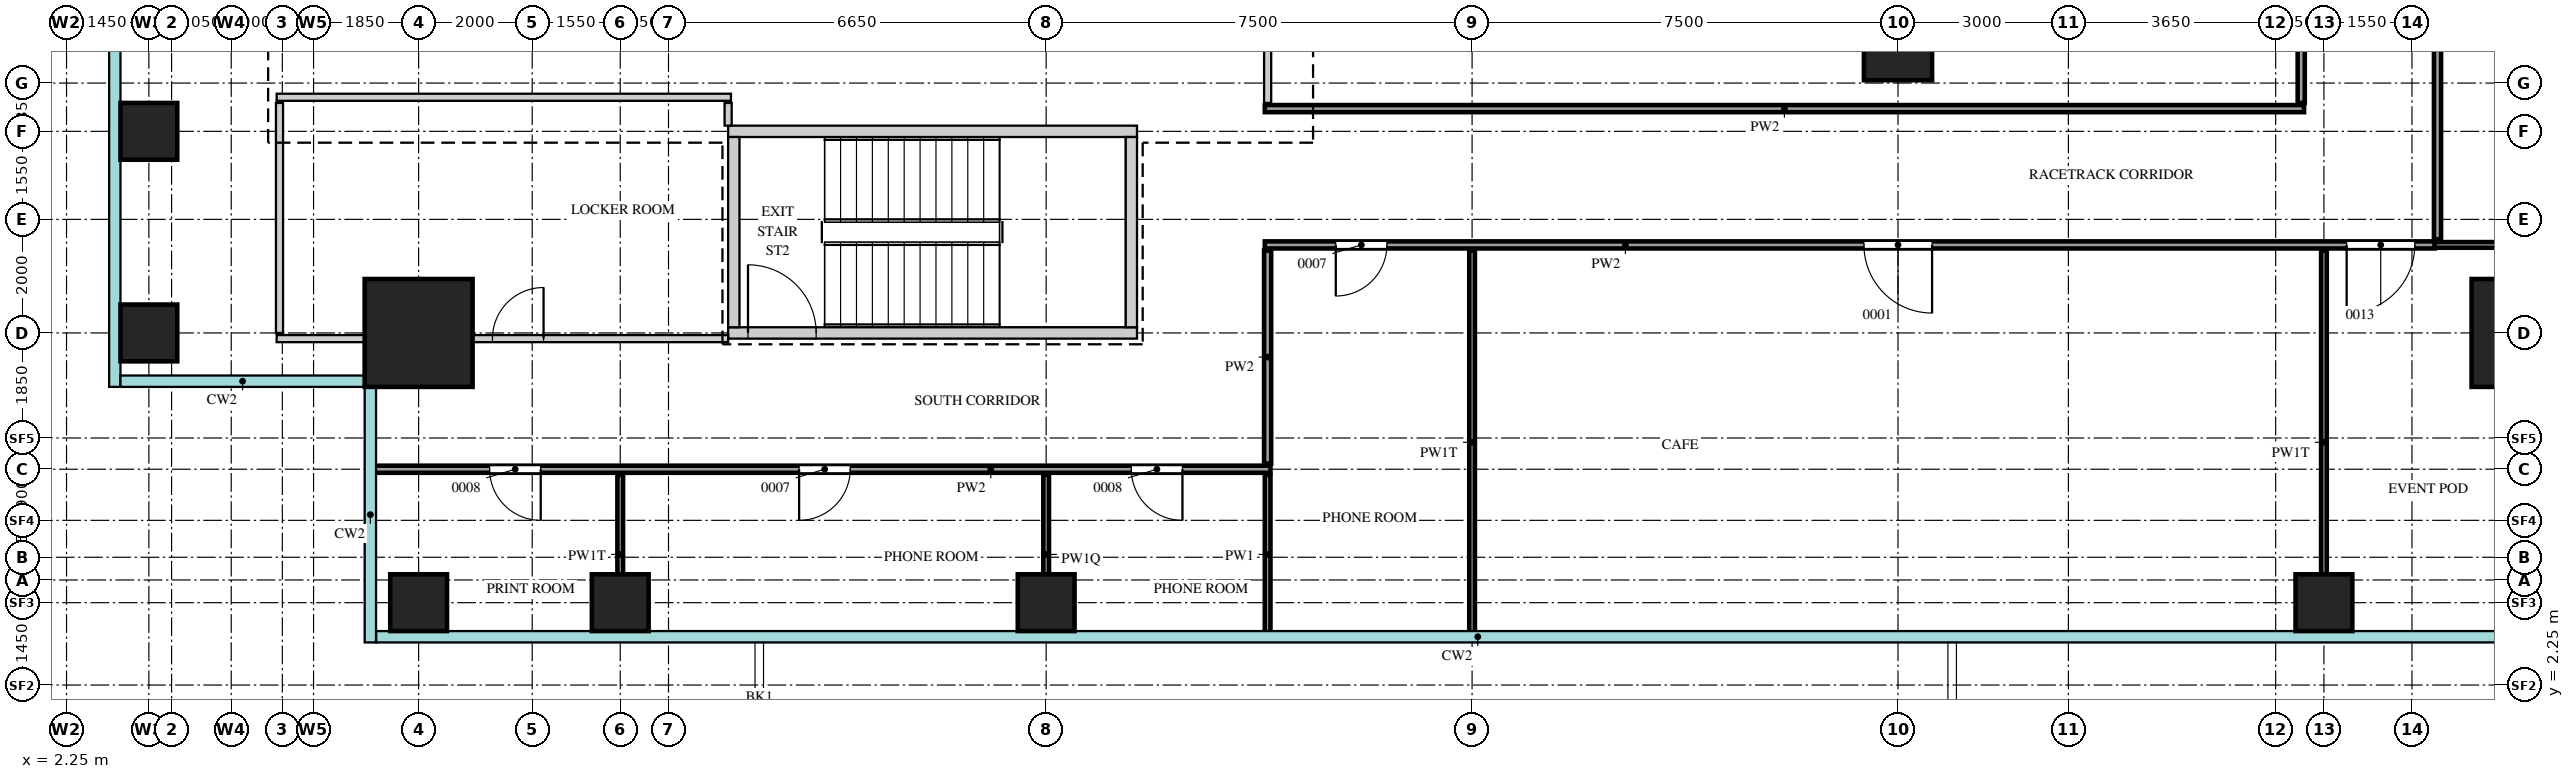
"""IFC4 building model, lengths in metres.
Left out: names, types, materials, properties, quantities, classifications, styles, units other than length and angle.
Written with IfcOpenShell. Run it as: python <this file> out.ifc"""

import sys

from ifc_helpers import new_model, si_unit, direction, frame, frame_2d, origin, origin_2d, place, context, subcontext, project, spatial, rectangle, extrude, source, transform, mapped, element, fill, save


model = new_model("IFC4")
c1 = context("Model", 3, precision=1e-05, world=origin(), true_north=direction((0.0, 1.0)))
c2 = subcontext(c1, "Body", "Model", "MODEL_VIEW")
j1 = project(units=[si_unit("LENGTHUNIT", "METRE"), si_unit("PLANEANGLEUNIT", "RADIAN")], contexts=[c1])
p1 = place(None, origin())
s1 = spatial("IfcSite", under=j1, at=p1, CompositionType="ELEMENT")
p2 = place(p1, origin())
s2 = spatial("IfcBuilding", under=s1, at=p2, CompositionType="ELEMENT")
p3 = place(p2, frame((0.0, 0.0, 196.7)))
s3 = spatial("IfcBuildingStorey", under=s2, at=p3, CompositionType="ELEMENT", Elevation=196.7)
m1 = source(origin(), c2, "Body", "SweptSolid", [
    extrude(rectangle(XDim=7.2, YDim=0.2, at=frame_2d((3.6, 0.0))), origin(), (0.0, 0.0, 1.0), 3.75),
])
p4 = place(p3, frame((13.9, 12.0, 0.0), z_axis=(0.0, 0.0, 1.0), x_axis=(1.0, 0.0, 0.0)))
e1 = element("IfcWall", 1, at=p4, inside=s3, PredefinedType="SHEAR", context=c2, shape_type="MappedRepresentation", body=[
    mapped(m1, transform((0.0, 0.0, 0.0))),
])
p5 = place(p3, frame((13.9, 8.45, 0.0), z_axis=(0.0, 0.0, 1.0), x_axis=(1.0, 0.0, 0.0)))
e2 = element("IfcWall", 2, at=p5, inside=s3, PredefinedType="SHEAR", context=c2, shape_type="MappedRepresentation", body=[
    mapped(m1, transform((0.0, 0.0, 0.0))),
])
m2 = source(origin(), c2, "Body", "SweptSolid", [
    extrude(rectangle(XDim=1.2, YDim=2.1, at=frame_2d((0.6, 1.05))), frame((0.0, 0.11, 0.0), z_axis=(0.0, -1.0, 0.0), x_axis=(1.0, 0.0, 0.0)), (0.0, 0.0, 1.0), 0.22),
])
p6 = place(p5, frame((0.35, 0.0, 0.0)))
e3 = element("IfcOpeningElement", 3, at=p6, cuts=e2, PredefinedType="OPENING", context=c2, shape_type="MappedRepresentation", body=[
    mapped(m2, transform((0.0, 0.0, 0.0))),
])
m3 = source(origin(), c2, "Body", "SweptSolid", [
    extrude(rectangle(XDim=3.35, YDim=0.2, at=frame_2d((1.675, 0.0))), origin(), (0.0, 0.0, 1.0), 3.75),
])
for number, where, z_axis, x_axis in (
    (4, (21.0, 8.55, 0.0), (0.0, 0.0, 1.0), (0.0, 1.0, 0.0)),
    (5, (14.0, 8.55, 0.0), (0.0, 0.0, 1.0), (0.0, 1.0, 0.0)),
):
    element("IfcWall", number, at=place(p3, frame(where, z_axis=z_axis, x_axis=x_axis)), inside=s3, PredefinedType="SHEAR", context=c2, shape_type="MappedRepresentation", body=[
        mapped(m3, transform((0.0, 0.0, 0.0))),
    ])
m4 = source(origin(), c2, "Body", "SweptSolid", [
    extrude(rectangle(XDim=1.9, YDim=1.9, at=origin_2d()), origin(), (0.0, 0.0, 1.0), 4.0),
])
for number, where, z_axis, x_axis in (
    (6, (45.55, 8.45, 0.0), (0.0, 0.0, 1.0), (1.0, 0.0, 0.0)),
    (7, (8.45, 8.45, 0.0), (0.0, 0.0, 1.0), (1.0, 0.0, 0.0)),
):
    element("IfcColumn", number, at=place(p3, frame(where, z_axis=z_axis, x_axis=x_axis)), inside=s3, PredefinedType="COLUMN", context=c2, shape_type="MappedRepresentation", body=[
        mapped(m4, transform((0.0, 0.0, 0.0))),
    ])
m5 = source(origin(), c2, "Body", "SweptSolid", [
    extrude(rectangle(XDim=1.0, YDim=1.0, at=origin_2d()), origin(), (0.0, 0.0, 1.0), 3.75),
])
for number, where, z_axis, x_axis in (
    (8, (8.45, 3.7, 0.0), (0.0, 0.0, 1.0), (1.0, 0.0, 0.0)),
    (9, (12.0, 3.7, 0.0), (0.0, 0.0, 1.0), (1.0, 0.0, 0.0)),
    (10, (19.5, 3.7, 0.0), (0.0, 0.0, 1.0), (1.0, 0.0, 0.0)),
    (11, (42.0, 3.7, 0.0), (0.0, 0.0, 1.0), (1.0, 0.0, 0.0)),
    (12, (3.7, 8.45, 0.0), (0.0, 0.0, 1.0), (1.0, 0.0, 0.0)),
    (13, (3.7, 12.0, 0.0), (0.0, 0.0, 1.0), (1.0, 0.0, 0.0)),
):
    element("IfcColumn", number, at=place(p3, frame(where, z_axis=z_axis, x_axis=x_axis)), inside=s3, PredefinedType="COLUMN", context=c2, shape_type="MappedRepresentation", body=[
        mapped(m5, transform((0.0, 0.0, 0.0))),
    ])
m6 = source(origin(), c2, "Body", "SweptSolid", [
    extrude(rectangle(XDim=1.2, YDim=1.2, at=origin_2d()), origin(), (0.0, 0.0, 1.0), 3.75),
])
p7 = place(p3, frame((34.5, 13.5, 0.0), z_axis=(0.0, 0.0, 1.0), x_axis=(1.0, 0.0, 0.0)))
e14 = element("IfcColumn", 14, at=p7, inside=s3, PredefinedType="COLUMN", context=c2, shape_type="MappedRepresentation", body=[
    mapped(m6, transform((0.0, 0.0, 0.0))),
])
m7 = source(origin(), c2, "Body", "SweptSolid", [
    extrude(rectangle(XDim=2.8, YDim=0.1, at=frame_2d((1.4, 0.0))), origin(), (0.0, 0.0, 1.0), 3.3),
])
p8 = place(p3, frame((12.0, 3.15, 0.0), z_axis=(0.0, 0.0, 1.0), x_axis=(0.0, 1.0, 0.0)))
e15 = element("IfcWall", 15, at=p8, inside=s3, PredefinedType="PARTITIONING", context=c2, shape_type="MappedRepresentation", body=[
    mapped(m7, transform((0.0, 0.0, 0.0))),
])
m8 = source(origin(), c2, "Body", "SweptSolid", [
    extrude(rectangle(XDim=2.8, YDim=0.1, at=frame_2d((1.4, 0.0))), origin(), (0.0, 0.0, 1.0), 3.42),
])
p9 = place(p3, frame((19.5, 3.15, 0.0), z_axis=(0.0, 0.0, 1.0), x_axis=(0.0, 1.0, 0.0)))
e16 = element("IfcWall", 16, at=p9, inside=s3, PredefinedType="PARTITIONING", context=c2, shape_type="MappedRepresentation", body=[
    mapped(m8, transform((0.0, 0.0, 0.0))),
])
m9 = source(origin(), c2, "Body", "SweptSolid", [
    extrude(rectangle(XDim=2.8, YDim=0.1, at=frame_2d((1.4, 0.0))), origin(), (0.0, 0.0, 1.0), 3.8),
])
p10 = place(p3, frame((23.4, 3.15, 0.0), z_axis=(0.0, 0.0, 1.0), x_axis=(0.0, 1.0, 0.0)))
e17 = element("IfcWall", 17, at=p10, inside=s3, PredefinedType="PARTITIONING", context=c2, shape_type="MappedRepresentation", body=[
    mapped(m9, transform((0.0, 0.0, 0.0))),
])
m10 = source(origin(), c2, "Body", "SweptSolid", [
    extrude(rectangle(XDim=6.75, YDim=0.1, at=frame_2d((3.375, 0.0))), origin(), (0.0, 0.0, 1.0), 3.3),
])
for number, where, z_axis, x_axis in (
    (18, (27.0, 3.15, 0.0), (0.0, 0.0, 1.0), (0.0, 1.0, 0.0)),
    (19, (42.0, 3.15, 0.0), (0.0, 0.0, 1.0), (0.0, 1.0, 0.0)),
):
    element("IfcWall", number, at=place(p3, frame(where, z_axis=z_axis, x_axis=x_axis)), inside=s3, PredefinedType="PARTITIONING", context=c2, shape_type="MappedRepresentation", body=[
        mapped(m10, transform((0.0, 0.0, 0.0))),
    ])
m11 = source(origin(), c2, "Body", "SweptSolid", [
    extrude(rectangle(XDim=15.8, YDim=0.125, at=frame_2d((7.9, 0.0))), origin(), (0.0, 0.0, 1.0), 3.8),
])
p11 = place(p3, frame((7.65, 6.05, 0.0), z_axis=(0.0, 0.0, 1.0), x_axis=(1.0, 0.0, 0.0)))
e20 = element("IfcWall", 20, at=p11, inside=s3, PredefinedType="PARTITIONING", context=c2, shape_type="MappedRepresentation", body=[
    mapped(m11, transform((0.0, 0.0, 0.0))),
])
m12 = source(origin(), c2, "Body", "SweptSolid", [
    extrude(rectangle(XDim=0.9, YDim=2.1, at=frame_2d((0.45, 1.05))), frame((0.0, 0.073, 0.0), z_axis=(0.0, -1.0, 0.0), x_axis=(1.0, 0.0, 0.0)), (0.0, 0.0, 1.0), 0.145),
])
p12 = place(p11, frame((2.05, 0.0, 0.0)))
e21 = element("IfcOpeningElement", 21, at=p12, cuts=e20, PredefinedType="OPENING", context=c2, shape_type="MappedRepresentation", body=[
    mapped(m12, transform((0.0, 0.0, 0.0))),
])
p13 = place(p11, frame((7.5, 0.0, 0.0)))
e22 = element("IfcOpeningElement", 22, at=p13, cuts=e20, PredefinedType="OPENING", context=c2, shape_type="MappedRepresentation", body=[
    mapped(m12, transform((0.0, 0.0, 0.0))),
])
p14 = place(p11, frame((13.35, 0.0, 0.0)))
e23 = element("IfcOpeningElement", 23, at=p14, cuts=e20, PredefinedType="OPENING", context=c2, shape_type="MappedRepresentation", body=[
    mapped(m12, transform((0.0, 0.0, 0.0))),
])
m13 = source(origin(), c2, "Body", "SweptSolid", [
    extrude(rectangle(XDim=3.75, YDim=0.125, at=frame_2d((1.875, 0.0))), origin(), (0.0, 0.0, 1.0), 3.8),
])
p15 = place(p3, frame((23.4, 6.15, 0.0), z_axis=(0.0, 0.0, 1.0), x_axis=(0.0, 1.0, 0.0)))
e24 = element("IfcWall", 24, at=p15, inside=s3, PredefinedType="PARTITIONING", context=c2, shape_type="MappedRepresentation", body=[
    mapped(m13, transform((0.0, 0.0, 0.0))),
])
m14 = source(origin(), c2, "Body", "SweptSolid", [
    extrude(rectangle(XDim=7.95, YDim=0.125, at=frame_2d((3.975, 0.0))), origin(), (0.0, 0.0, 1.0), 3.25),
])
p16 = place(p3, frame((5.95, 8.35, 0.0), z_axis=(0.0, 0.0, 1.0), x_axis=(1.0, 0.0, 0.0)))
e25 = element("IfcWall", 25, at=p16, inside=s3, PredefinedType="PARTITIONING", context=c2, shape_type="MappedRepresentation", body=[
    mapped(m14, transform((0.0, 0.0, 0.0))),
])
p17 = place(p16, frame((3.8, 0.0, 0.0)))
e26 = element("IfcOpeningElement", 26, at=p17, cuts=e25, PredefinedType="OPENING", context=c2, shape_type="MappedRepresentation", body=[
    mapped(m12, transform((0.0, 0.0, 0.0))),
])
m15 = source(origin(), c2, "Body", "SweptSolid", [
    extrude(rectangle(XDim=4.05, YDim=0.125, at=frame_2d((2.025, 0.0))), origin(), (0.0, 0.0, 1.0), 3.8),
])
p18 = place(p3, frame((6.0, 8.45, 0.0), z_axis=(0.0, 0.0, 1.0), x_axis=(0.0, 1.0, 0.0)))
e27 = element("IfcWall", 27, at=p18, inside=s3, PredefinedType="PARTITIONING", context=c2, shape_type="MappedRepresentation", body=[
    mapped(m15, transform((0.0, 0.0, 0.0))),
])
m16 = source(origin(), c2, "Body", "SweptSolid", [
    extrude(rectangle(XDim=20.6, YDim=0.125, at=frame_2d((10.3, 0.0))), origin(), (0.0, 0.0, 1.0), 3.8),
])
p19 = place(p3, frame((23.35, 10.0, 0.0), z_axis=(0.0, 0.0, 1.0), x_axis=(1.0, 0.0, 0.0)))
e28 = element("IfcWall", 28, at=p19, inside=s3, PredefinedType="PARTITIONING", context=c2, shape_type="MappedRepresentation", body=[
    mapped(m16, transform((0.0, 0.0, 0.0))),
])
p20 = place(p19, frame((1.25, 0.0, 0.0)))
e29 = element("IfcOpeningElement", 29, at=p20, cuts=e28, PredefinedType="OPENING", context=c2, shape_type="MappedRepresentation", body=[
    mapped(m12, transform((0.0, 0.0, 0.0))),
])
m17 = source(origin(), c2, "Body", "SweptSolid", [
    extrude(rectangle(XDim=1.2, YDim=2.1, at=frame_2d((0.6, 1.05))), frame((0.0, 0.073, 0.0), z_axis=(0.0, -1.0, 0.0), x_axis=(1.0, 0.0, 0.0)), (0.0, 0.0, 1.0), 0.145),
])
p21 = place(p19, frame((10.55, 0.0, 0.0)))
e30 = element("IfcOpeningElement", 30, at=p21, cuts=e28, PredefinedType="OPENING", context=c2, shape_type="MappedRepresentation", body=[
    mapped(m17, transform((0.0, 0.0, 0.0))),
])
p22 = place(p19, frame((19.05, 0.0, 0.0)))
e31 = element("IfcOpeningElement", 31, at=p22, cuts=e28, PredefinedType="OPENING", context=c2, shape_type="MappedRepresentation", body=[
    mapped(m17, transform((0.0, 0.0, 0.0))),
])
m18 = source(origin(), c2, "Body", "SweptSolid", [
    extrude(rectangle(XDim=6.9, YDim=0.1, at=frame_2d((3.45, 0.0))), origin(), (0.0, 0.0, 1.0), 3.8),
])
p23 = place(p3, frame((43.95, 10.0, 0.0), z_axis=(0.0, 0.0, 1.0), x_axis=(1.0, 0.0, 0.0)))
e32 = element("IfcWall", 32, at=p23, inside=s3, PredefinedType="PARTITIONING", context=c2, shape_type="MappedRepresentation", body=[
    mapped(m18, transform((0.0, 0.0, 0.0))),
])
m19 = source(origin(), c2, "Body", "SweptSolid", [
    extrude(rectangle(XDim=33.8, YDim=0.125, at=frame_2d((16.9, 0.0))), origin(), (0.0, 0.0, 1.0), 3.8),
])
p24 = place(p3, frame((44.0, 10.1, 0.0), z_axis=(0.0, 0.0, 1.0), x_axis=(0.0, 1.0, 0.0)))
e33 = element("IfcWall", 33, at=p24, inside=s3, PredefinedType="PARTITIONING", context=c2, shape_type="MappedRepresentation", body=[
    mapped(m19, transform((0.0, 0.0, 0.0))),
])
p25 = place(p24, frame((5.25, 0.0, 0.0)))
e34 = element("IfcOpeningElement", 34, at=p25, cuts=e33, PredefinedType="OPENING", context=c2, shape_type="MappedRepresentation", body=[
    mapped(m12, transform((0.0, 0.0, 0.0))),
])
p26 = place(p24, frame((12.55, 0.0, 0.0)))
e35 = element("IfcOpeningElement", 35, at=p26, cuts=e33, PredefinedType="OPENING", context=c2, shape_type="MappedRepresentation", body=[
    mapped(m12, transform((0.0, 0.0, 0.0))),
])
p27 = place(p24, frame((23.6, 0.0, 0.0)))
e36 = element("IfcOpeningElement", 36, at=p27, cuts=e33, PredefinedType="OPENING", context=c2, shape_type="MappedRepresentation", body=[
    mapped(m12, transform((0.0, 0.0, 0.0))),
])
p28 = place(p24, frame((32.3, 0.0, 0.0)))
e37 = element("IfcOpeningElement", 37, at=p28, cuts=e33, PredefinedType="OPENING", context=c2, shape_type="MappedRepresentation", body=[
    mapped(m12, transform((0.0, 0.0, 0.0))),
])
m20 = source(origin(), c2, "Body", "SweptSolid", [
    extrude(rectangle(XDim=0.4, YDim=0.125, at=frame_2d((0.2, 0.0))), origin(), (0.0, 0.0, 1.0), 3.8),
])
p29 = place(p3, frame((13.9, 12.1, 0.0), z_axis=(0.0, 0.0, 1.0), x_axis=(0.0, 1.0, 0.0)))
e38 = element("IfcWall", 38, at=p29, inside=s3, PredefinedType="PARTITIONING", context=c2, shape_type="MappedRepresentation", body=[
    mapped(m20, transform((0.0, 0.0, 0.0))),
])
m21 = source(origin(), c2, "Body", "SweptSolid", [
    extrude(rectangle(XDim=18.3, YDim=0.125, at=frame_2d((9.15, 0.0))), origin(), (0.0, 0.0, 1.0), 3.8),
])
p30 = place(p3, frame((23.35, 12.4, 0.0), z_axis=(0.0, 0.0, 1.0), x_axis=(1.0, 0.0, 0.0)))
e39 = element("IfcWall", 39, at=p30, inside=s3, PredefinedType="PARTITIONING", context=c2, shape_type="MappedRepresentation", body=[
    mapped(m21, transform((0.0, 0.0, 0.0))),
])
m22 = source(origin(), c2, "Body", "SweptSolid", [
    extrude(rectangle(XDim=23.4, YDim=0.125, at=frame_2d((11.7, 0.0))), origin(), (0.0, 0.0, 1.0), 3.8),
])
p31 = place(p3, frame((23.4, 12.5, 0.0), z_axis=(0.0, 0.0, 1.0), x_axis=(0.0, 1.0, 0.0)))
e40 = element("IfcWall", 40, at=p31, inside=s3, PredefinedType="PARTITIONING", context=c2, shape_type="MappedRepresentation", body=[
    mapped(m22, transform((0.0, 0.0, 0.0))),
])
p32 = place(p31, frame((6.6, 0.0, 0.0)))
e41 = element("IfcOpeningElement", 41, at=p32, cuts=e40, PredefinedType="OPENING", context=c2, shape_type="MappedRepresentation", body=[
    mapped(m17, transform((0.0, 0.0, 0.0))),
])
m23 = source(origin(), c2, "Body", "SweptSolid", [
    extrude(rectangle(XDim=29.0, YDim=0.125, at=frame_2d((14.5, 0.0))), origin(), (0.0, 0.0, 1.0), 3.8),
])
p33 = place(p3, frame((41.6, 12.5, 0.0), z_axis=(0.0, 0.0, 1.0), x_axis=(0.0, 1.0, 0.0)))
e42 = element("IfcWall", 42, at=p33, inside=s3, PredefinedType="PARTITIONING", context=c2, shape_type="MappedRepresentation", body=[
    mapped(m23, transform((0.0, 0.0, 0.0))),
])
p34 = place(p33, frame((18.4, 0.0, 0.0)))
e43 = element("IfcOpeningElement", 43, at=p34, cuts=e42, PredefinedType="OPENING", context=c2, shape_type="MappedRepresentation", body=[
    mapped(m17, transform((0.0, 0.0, 0.0))),
])
m24 = source(origin(), c2, "Body", "SweptSolid", [
    extrude(rectangle(XDim=8.0, YDim=0.125, at=frame_2d((4.0, 0.0))), origin(), (0.0, 0.0, 1.0), 3.8),
])
p35 = place(p3, frame((5.95, 12.6, 0.0), z_axis=(0.0, 0.0, 1.0), x_axis=(1.0, 0.0, 0.0)))
e44 = element("IfcWall", 44, at=p35, inside=s3, PredefinedType="PARTITIONING", context=c2, shape_type="MappedRepresentation", body=[
    mapped(m24, transform((0.0, 0.0, 0.0))),
])
m25 = source(origin(), c2, "Body", "SweptSolid", [
    extrude(rectangle(XDim=0.9, YDim=2.1, at=frame_2d((0.45, 1.05))), frame((0.0, 0.025, 0.0), z_axis=(0.0, -1.0, 0.0), x_axis=(1.0, 0.0, 0.0)), (0.0, 0.0, 1.0), 0.05),
])
p36 = place(p20, origin())
e45 = element("IfcDoor", 45, at=p36, inside=s3, OperationType="SINGLE_SWING_LEFT", PredefinedType="DOOR", context=c2, shape_type="MappedRepresentation", body=[
    mapped(m25, transform((0.0, 0.0, 0.0))),
])
fill(e29, e45)
m26 = source(origin(), c2, "Body", "SweptSolid", [
    extrude(rectangle(XDim=1.2, YDim=2.1, at=frame_2d((0.6, 1.05))), frame((0.0, 0.025, 0.0), z_axis=(0.0, -1.0, 0.0), x_axis=(1.0, 0.0, 0.0)), (0.0, 0.0, 1.0), 0.05),
])
p37 = place(p21, origin())
e46 = element("IfcDoor", 46, at=p37, inside=s3, OperationType="SINGLE_SWING_RIGHT", PredefinedType="DOOR", context=c2, shape_type="MappedRepresentation", body=[
    mapped(m26, transform((0.0, 0.0, 0.0))),
])
fill(e30, e46)
p38 = place(p22, origin())
e47 = element("IfcDoor", 47, at=p38, inside=s3, OperationType="SINGLE_SWING_LEFT", PredefinedType="DOOR", context=c2, shape_type="MappedRepresentation", body=[
    mapped(m26, transform((0.0, 0.0, 0.0))),
])
fill(e31, e47)
p39 = place(p17, origin())
e48 = element("IfcDoor", 48, at=p39, inside=s3, OperationType="SINGLE_SWING_LEFT", PredefinedType="DOOR", context=c2, shape_type="MappedRepresentation", body=[
    mapped(m25, transform((0.0, 0.0, 0.0))),
])
fill(e26, e48)
p40 = place(p12, origin())
e49 = element("IfcDoor", 49, at=p40, inside=s3, OperationType="SINGLE_SWING_RIGHT", PredefinedType="DOOR", context=c2, shape_type="MappedRepresentation", body=[
    mapped(m25, transform((0.0, 0.0, 0.0))),
])
fill(e21, e49)
p41 = place(p13, origin())
e50 = element("IfcDoor", 50, at=p41, inside=s3, OperationType="SINGLE_SWING_LEFT", PredefinedType="DOOR", context=c2, shape_type="MappedRepresentation", body=[
    mapped(m25, transform((0.0, 0.0, 0.0))),
])
fill(e22, e50)
p42 = place(p14, origin())
e51 = element("IfcDoor", 51, at=p42, inside=s3, OperationType="SINGLE_SWING_RIGHT", PredefinedType="DOOR", context=c2, shape_type="MappedRepresentation", body=[
    mapped(m25, transform((0.0, 0.0, 0.0))),
])
fill(e23, e51)
p43 = place(p6, origin())
e52 = element("IfcDoor", 52, at=p43, inside=s3, OperationType="SINGLE_SWING_RIGHT", PredefinedType="DOOR", context=c2, shape_type="MappedRepresentation", body=[
    mapped(m26, transform((0.0, 0.0, 0.0))),
])
fill(e3, e52)
save(model, sys.argv[1])
